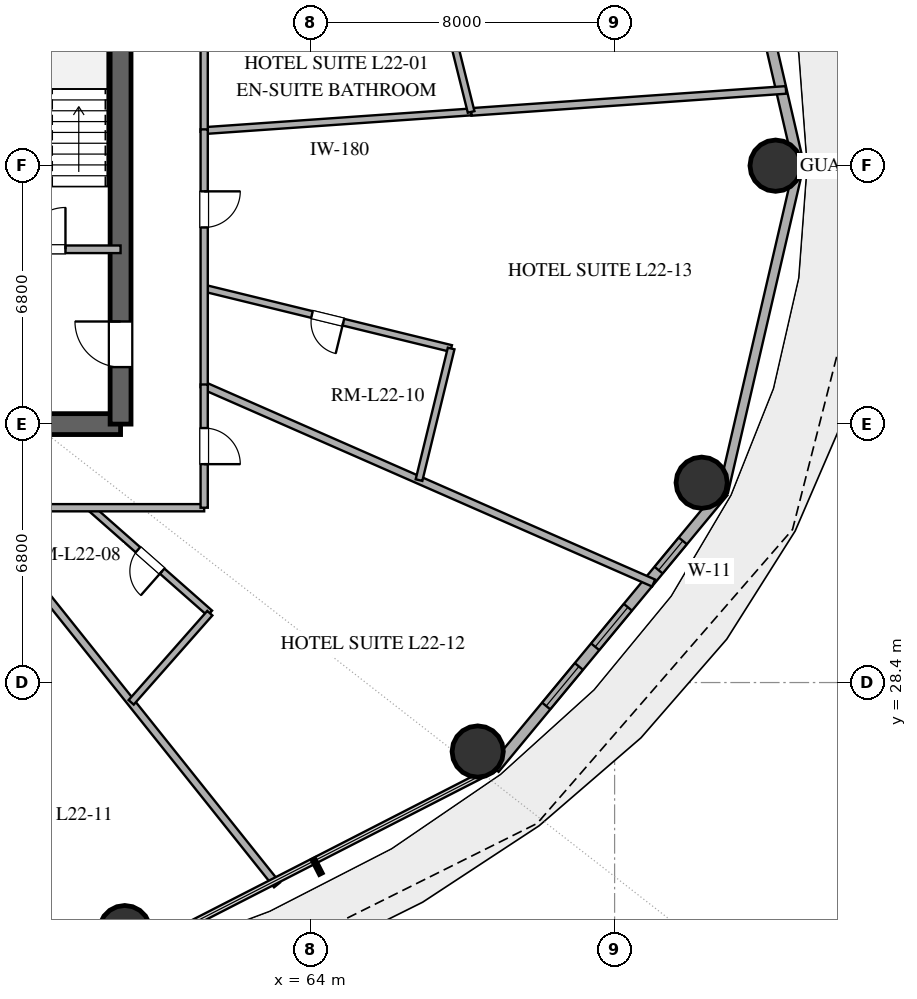
"""IFC4 building model, lengths in metres.
Left out: names, types, materials, properties, quantities, classifications, styles, units other than length and angle.
Written with IfcOpenShell. Run it as: python <this file> out.ifc"""

import sys

from ifc_helpers import new_model, si_unit, direction, frame, frame_2d, origin, origin_2d, place, context, subcontext, project, spatial, rectangle, hollow_circle, extrude, element, fill, save


model = new_model("IFC4")
c1 = context("Model", 3, precision=1e-05, world=origin(), true_north=direction((0.0, 1.0)))
c2 = subcontext(c1, "Body", "Model", "MODEL_VIEW")
j1 = project(units=[si_unit("LENGTHUNIT", "METRE"), si_unit("PLANEANGLEUNIT", "RADIAN")], contexts=[c1])
p1 = place(None, origin())
s1 = spatial("IfcSite", under=j1, at=p1, CompositionType="ELEMENT")
p2 = place(p1, origin())
s2 = spatial("IfcBuilding", under=s1, at=p2, CompositionType="ELEMENT")
p3 = place(p2, frame((0.0, 0.0, 91.2)))
s3 = spatial("IfcBuildingStorey", under=s2, at=p3, CompositionType="ELEMENT", Elevation=91.2)
p4 = place(p3, frame((55.0, 35.2, 0.0), z_axis=(0.0, 0.0, 1.0), x_axis=(1.0, 0.0, 0.0)))
e1 = element("IfcWall", 1, at=p4, inside=s3, PredefinedType="SHEAR", context=c2, shape_type="SweptSolid", body=[
    extrude(rectangle(XDim=4.0, YDim=0.55, at=frame_2d((2.0, 0.0))), origin(), (0.0, 0.0, 1.0), 3.38),
])
p5 = place(p3, frame((59.0, 35.2, 0.0), z_axis=(0.0, 0.0, 1.0), x_axis=(0.0, 1.0, 0.0)))
e2 = element("IfcWall", 2, at=p5, inside=s3, PredefinedType="SHEAR", context=c2, shape_type="SweptSolid", body=[
    extrude(rectangle(XDim=13.6, YDim=0.55, at=frame_2d((6.8, 0.0))), origin(), (0.0, 0.0, 1.0), 3.38),
])
p6 = place(p5, frame((1.5, 0.0, 0.0)))
e3 = element("IfcOpeningElement", 3, at=p6, cuts=e2, PredefinedType="OPENING", context=c2, shape_type="SweptSolid", body=[
    extrude(rectangle(XDim=1.2, YDim=2.15, at=frame_2d((0.6, 1.075))), frame((0.0, 0.285, 0.0), z_axis=(0.0, -1.0, 0.0), x_axis=(1.0, 0.0, 0.0)), (0.0, 0.0, 1.0), 0.57),
])
for number, where, z_axis, x_axis in (
    (4, (76.237, 42.0, 0.0), (0.0, 0.0, 1.0), (1.0, 0.0, 0.0)),
    (5, (59.11, 21.859, 0.0), (0.0, 0.0, 1.0), (1.0, 0.0, 0.0)),
    (6, (68.398, 26.585, 0.0), (0.0, 0.0, 1.0), (1.0, 0.0, 0.0)),
    (7, (74.291, 33.657, 0.0), (0.0, 0.0, 1.0), (1.0, 0.0, 0.0)),
):
    element("IfcColumn", number, at=place(p3, frame(where, z_axis=z_axis, x_axis=x_axis)), inside=s3, PredefinedType="COLUMN", context=c2, shape_type="SweptSolid", body=[
        extrude(hollow_circle(Radius=0.675, WallThickness=0.036, at=origin_2d()), origin(), (0.0, 0.0, 1.0), 3.38),
    ])
p7 = place(p3, frame((76.849, 42.0, 0.0), z_axis=(0.0, 0.0, 1.0), x_axis=(-0.22558597182, 0.974223264616, 0.0)))
e8 = element("IfcWall", 8, at=p7, inside=s3, PredefinedType="SOLIDWALL", context=c2, shape_type="SweptSolid", body=[
    extrude(rectangle(XDim=8.811, YDim=0.28, at=frame_2d((4.405, 0.0))), origin(), (0.0, 0.0, 1.0), 3.38),
])
p8 = place(p7, frame((6.175, 0.0, 0.0)))
e9 = element("IfcOpeningElement", 9, at=p8, cuts=e8, PredefinedType="OPENING", context=c2, shape_type="SweptSolid", body=[
    extrude(rectangle(XDim=1.1, YDim=2.25, at=frame_2d((0.55, 1.125))), frame((0.0, 0.15, 0.0), z_axis=(0.0, -1.0, 0.0), x_axis=(1.0, 0.0, 0.0)), (0.0, 0.0, 1.0), 0.3),
])
p9 = place(p3, frame((68.84, 26.14, 0.0), z_axis=(0.0, 0.0, 1.0), x_axis=(0.637505817448, 0.770445541696, 0.0)))
e10 = element("IfcWall", 10, at=p9, inside=s3, PredefinedType="SOLIDWALL", context=c2, shape_type="SweptSolid", body=[
    extrude(rectangle(XDim=9.445, YDim=0.28, at=frame_2d((4.723, 0.0))), origin(), (0.0, 0.0, 1.0), 3.38),
])
p10 = place(p9, frame((2.133, 0.0, 0.85)))
e11 = element("IfcOpeningElement", 11, at=p10, cuts=e10, PredefinedType="OPENING", context=c2, shape_type="SweptSolid", body=[
    extrude(rectangle(XDim=1.35, YDim=1.8, at=frame_2d((0.675, 0.9))), frame((0.0, 0.15, 0.0), z_axis=(0.0, -1.0, 0.0), x_axis=(1.0, 0.0, 0.0)), (0.0, 0.0, 1.0), 0.3),
])
p11 = place(p9, frame((4.156, 0.0, 0.85)))
e12 = element("IfcOpeningElement", 12, at=p11, cuts=e10, PredefinedType="OPENING", context=c2, shape_type="SweptSolid", body=[
    extrude(rectangle(XDim=1.35, YDim=1.8, at=frame_2d((0.675, 0.9))), frame((0.0, 0.15, 0.0), z_axis=(0.0, -1.0, 0.0), x_axis=(1.0, 0.0, 0.0)), (0.0, 0.0, 1.0), 0.3),
])
p12 = place(p9, frame((6.772, 0.0, 0.85)))
e13 = element("IfcOpeningElement", 13, at=p12, cuts=e10, PredefinedType="OPENING", context=c2, shape_type="SweptSolid", body=[
    extrude(rectangle(XDim=1.0, YDim=1.8, at=frame_2d((0.5, 0.9))), frame((0.0, 0.15, 0.0), z_axis=(0.0, -1.0, 0.0), x_axis=(1.0, 0.0, 0.0)), (0.0, 0.0, 1.0), 0.3),
])
p13 = place(p3, frame((74.861, 33.417, 0.0), z_axis=(0.0, 0.0, 1.0), x_axis=(0.22558597182, 0.974223264616, 0.0)))
e14 = element("IfcWall", 14, at=p13, inside=s3, PredefinedType="SOLIDWALL", context=c2, shape_type="SweptSolid", body=[
    extrude(rectangle(XDim=8.811, YDim=0.25, at=frame_2d((4.405, 0.0))), origin(), (0.0, 0.0, 1.0), 3.38),
])
p14 = place(p3, frame((55.0, 39.8, 0.0), z_axis=(0.0, 0.0, 1.0), x_axis=(1.0, 0.0, 0.0)))
e15 = element("IfcWall", 15, at=p14, inside=s3, PredefinedType="SOLIDWALL", context=c2, shape_type="SweptSolid", body=[
    extrude(rectangle(XDim=4.0, YDim=0.2, at=frame_2d((2.0, 0.0))), origin(), (0.0, 0.0, 1.0), 2.74),
])
p15 = place(p14, frame((1.45, 0.0, 0.0)))
e16 = element("IfcOpeningElement", 16, at=p15, cuts=e15, PredefinedType="OPENING", context=c2, shape_type="SweptSolid", body=[
    extrude(rectangle(XDim=1.1, YDim=2.15, at=frame_2d((0.55, 1.075))), frame((0.0, 0.11, 0.0), z_axis=(0.0, -1.0, 0.0), x_axis=(1.0, 0.0, 0.0)), (0.0, 0.0, 1.0), 0.22),
])
p16 = place(p3, frame((76.509, 43.994, 0.0), z_axis=(0.0, 0.0, 1.0), x_axis=(-0.997563838401, -0.069759503404, 0.0)))
e17 = element("IfcWall", 17, at=p16, inside=s3, PredefinedType="PARTITIONING", context=c2, shape_type="SweptSolid", body=[
    extrude(rectangle(XDim=8.305, YDim=0.2, at=frame_2d((4.152, 0.0))), origin(), (0.0, 0.0, 1.0), 2.74),
])
p17 = place(p3, frame((68.224, 43.414, 0.0), z_axis=(0.0, 0.0, 1.0), x_axis=(-0.997563891584, -0.06975874287, 0.0)))
e18 = element("IfcWall", 18, at=p17, inside=s3, PredefinedType="PLUMBINGWALL", context=c2, shape_type="SweptSolid", body=[
    extrude(rectangle(XDim=7.042, YDim=0.18, at=frame_2d((3.521, 0.0))), origin(), (0.0, 0.0, 1.0), 2.74),
])
p18 = place(p3, frame((61.2, 36.208, 0.0), z_axis=(0.0, 0.0, 1.0), x_axis=(0.915722078144, -0.401812239235, 0.0)))
e19 = element("IfcWall", 19, at=p18, inside=s3, PredefinedType="PARTITIONING", context=c2, shape_type="SweptSolid", body=[
    extrude(rectangle(XDim=12.915, YDim=0.2, at=frame_2d((6.458, 0.0))), origin(), (0.0, 0.0, 1.0), 2.74),
])
p19 = place(p3, frame((67.699, 37.189, 0.0), z_axis=(0.0, 0.0, 1.0), x_axis=(-0.971448370468, 0.237251055878, 0.0)))
e20 = element("IfcWall", 20, at=p19, inside=s3, PredefinedType="PLUMBINGWALL", context=c2, shape_type="SweptSolid", body=[
    extrude(rectangle(XDim=6.69, YDim=0.18, at=frame_2d((3.345, 0.0))), origin(), (0.0, 0.0, 1.0), 2.74),
])
p20 = place(p19, frame((2.92, 0.0, 0.0)))
e21 = element("IfcOpeningElement", 21, at=p20, cuts=e20, PredefinedType="OPENING", context=c2, shape_type="SweptSolid", body=[
    extrude(rectangle(XDim=0.85, YDim=2.1, at=frame_2d((0.425, 1.05))), frame((0.0, 0.1, 0.0), z_axis=(0.0, -1.0, 0.0), x_axis=(1.0, 0.0, 0.0)), (0.0, 0.0, 1.0), 0.2),
])
p21 = place(p3, frame((55.189, 33.0, 0.0), z_axis=(0.0, 0.0, 1.0), x_axis=(0.624085468444, -0.781356082767, 0.0)))
e22 = element("IfcWall", 22, at=p21, inside=s3, PredefinedType="PARTITIONING", context=c2, shape_type="SweptSolid", body=[
    extrude(rectangle(XDim=12.703, YDim=0.2, at=frame_2d((6.352, 0.0))), origin(), (0.0, 0.0, 1.0), 2.74),
])
p22 = place(p3, frame((61.2, 51.0, 0.0), z_axis=(0.0, 0.0, 1.0), x_axis=(0.0, -1.0, 0.0)))
e23 = element("IfcWall", 23, at=p22, inside=s3, PredefinedType="PARTITIONING", context=c2, shape_type="SweptSolid", body=[
    extrude(rectangle(XDim=8.109, YDim=0.19, at=frame_2d((4.055, 0.0))), origin(), (0.0, 0.0, 1.0), 2.74),
])
p23 = place(p22, frame((2.806, 0.0, 0.0)))
e24 = element("IfcOpeningElement", 24, at=p23, cuts=e23, PredefinedType="OPENING", context=c2, shape_type="SweptSolid", body=[
    extrude(rectangle(XDim=0.95, YDim=2.15, at=frame_2d((0.475, 1.075))), frame((0.0, 0.105, 0.0), z_axis=(0.0, -1.0, 0.0), x_axis=(1.0, 0.0, 0.0)), (0.0, 0.0, 1.0), 0.21),
])
p24 = place(p3, frame((61.2, 42.955, 0.0), z_axis=(0.0, 0.0, 1.0), x_axis=(0.0, -1.0, 0.0)))
e25 = element("IfcWall", 25, at=p24, inside=s3, PredefinedType="PARTITIONING", context=c2, shape_type="SweptSolid", body=[
    extrude(rectangle(XDim=6.782, YDim=0.19, at=frame_2d((3.391, 0.0))), origin(), (0.0, 0.0, 1.0), 2.74),
])
p25 = place(p24, frame((1.631, 0.0, 0.0)))
e26 = element("IfcOpeningElement", 26, at=p25, cuts=e25, PredefinedType="OPENING", context=c2, shape_type="SweptSolid", body=[
    extrude(rectangle(XDim=0.95, YDim=2.15, at=frame_2d((0.475, 1.075))), frame((0.0, 0.105, 0.0), z_axis=(0.0, -1.0, 0.0), x_axis=(1.0, 0.0, 0.0)), (0.0, 0.0, 1.0), 0.21),
])
p26 = place(p3, frame((61.348, 30.225, 0.0), z_axis=(0.0, 0.0, 1.0), x_axis=(-0.749931272561, 0.661515749197, 0.0)))
e27 = element("IfcWall", 27, at=p26, inside=s3, PredefinedType="PLUMBINGWALL", context=c2, shape_type="SweptSolid", body=[
    extrude(rectangle(XDim=4.194, YDim=0.18, at=frame_2d((2.097, 0.0))), origin(), (0.0, 0.0, 1.0), 2.74),
])
p27 = place(p26, frame((1.672, 0.0, 0.0)))
e28 = element("IfcOpeningElement", 28, at=p27, cuts=e27, PredefinedType="OPENING", context=c2, shape_type="SweptSolid", body=[
    extrude(rectangle(XDim=0.85, YDim=2.1, at=frame_2d((0.425, 1.05))), frame((0.0, 0.1, 0.0), z_axis=(0.0, -1.0, 0.0), x_axis=(1.0, 0.0, 0.0)), (0.0, 0.0, 1.0), 0.2),
])
p28 = place(p3, frame((61.2, 33.0, 0.0), z_axis=(0.0, 0.0, 1.0), x_axis=(-1.0, 0.0, 0.0)))
e29 = element("IfcWall", 29, at=p28, inside=s3, PredefinedType="PARTITIONING", context=c2, shape_type="SweptSolid", body=[
    extrude(rectangle(XDim=11.496, YDim=0.19, at=frame_2d((5.748, 0.0))), origin(), (0.0, 0.0, 1.0), 2.74),
])
p29 = place(p28, frame((7.41, 0.0, 0.0)))
e30 = element("IfcOpeningElement", 30, at=p29, cuts=e29, PredefinedType="OPENING", context=c2, shape_type="SweptSolid", body=[
    extrude(rectangle(XDim=0.95, YDim=2.15, at=frame_2d((0.475, 1.075))), frame((0.0, 0.105, 0.0), z_axis=(0.0, -1.0, 0.0), x_axis=(1.0, 0.0, 0.0)), (0.0, 0.0, 1.0), 0.21),
])
p30 = place(p3, frame((66.853, 33.727, 0.0), z_axis=(0.0, 0.0, 1.0), x_axis=(0.237213207876, 0.971457613079, 0.0)))
e31 = element("IfcWall", 31, at=p30, inside=s3, PredefinedType="PLUMBINGWALL", context=c2, shape_type="SweptSolid", body=[
    extrude(rectangle(XDim=3.564, YDim=0.18, at=frame_2d((1.782, 0.0))), origin(), (0.0, 0.0, 1.0), 2.74),
])
p31 = place(p3, frame((67.377, 46.82, 0.0), z_axis=(0.0, 0.0, 1.0), x_axis=(0.241373388957, -0.970432319692, 0.0)))
e32 = element("IfcWall", 32, at=p31, inside=s3, PredefinedType="PLUMBINGWALL", context=c2, shape_type="SweptSolid", body=[
    extrude(rectangle(XDim=3.51, YDim=0.18, at=frame_2d((1.755, 0.0))), origin(), (0.0, 0.0, 1.0), 2.74),
])
p32 = place(p3, frame((61.2, 36.243, 0.0), z_axis=(0.0, 0.0, 1.0), x_axis=(0.0, -1.0, 0.0)))
e33 = element("IfcWall", 33, at=p32, inside=s3, PredefinedType="PARTITIONING", context=c2, shape_type="SweptSolid", body=[
    extrude(rectangle(XDim=3.243, YDim=0.19, at=frame_2d((1.621, 0.0))), origin(), (0.0, 0.0, 1.0), 2.74),
])
p33 = place(p32, frame((1.146, 0.0, 0.0)))
e34 = element("IfcOpeningElement", 34, at=p33, cuts=e33, PredefinedType="OPENING", context=c2, shape_type="SweptSolid", body=[
    extrude(rectangle(XDim=0.95, YDim=2.15, at=frame_2d((0.475, 1.075))), frame((0.0, 0.105, 0.0), z_axis=(0.0, -1.0, 0.0), x_axis=(1.0, 0.0, 0.0)), (0.0, 0.0, 1.0), 0.21),
])
p34 = place(p3, frame((59.279, 27.879, 0.0), z_axis=(0.0, 0.0, 1.0), x_axis=(0.661515810511, 0.749931218475, 0.0)))
e35 = element("IfcWall", 35, at=p34, inside=s3, PredefinedType="PLUMBINGWALL", context=c2, shape_type="SweptSolid", body=[
    extrude(rectangle(XDim=3.129, YDim=0.18, at=frame_2d((1.564, 0.0))), origin(), (0.0, 0.0, 1.0), 2.74),
])
p35 = place(p10, origin())
e36 = element("IfcWindow", 36, at=p35, inside=s3, PartitioningType="SINGLE_PANEL", PredefinedType="WINDOW", context=c2, shape_type="SweptSolid", body=[
    extrude(rectangle(XDim=1.35, YDim=1.8, at=frame_2d((0.675, 0.9))), frame((0.0, 0.03, 0.0), z_axis=(0.0, -1.0, 0.0), x_axis=(1.0, 0.0, 0.0)), (0.0, 0.0, 1.0), 0.06),
])
fill(e11, e36)
p36 = place(p11, origin())
e37 = element("IfcWindow", 37, at=p36, inside=s3, PartitioningType="SINGLE_PANEL", PredefinedType="WINDOW", context=c2, shape_type="SweptSolid", body=[
    extrude(rectangle(XDim=1.35, YDim=1.8, at=frame_2d((0.675, 0.9))), frame((0.0, 0.03, 0.0), z_axis=(0.0, -1.0, 0.0), x_axis=(1.0, 0.0, 0.0)), (0.0, 0.0, 1.0), 0.06),
])
fill(e12, e37)
p37 = place(p12, origin())
e38 = element("IfcWindow", 38, at=p37, inside=s3, PartitioningType="SINGLE_PANEL", PredefinedType="WINDOW", context=c2, shape_type="SweptSolid", body=[
    extrude(rectangle(XDim=1.0, YDim=1.8, at=frame_2d((0.5, 0.9))), frame((0.0, 0.03, 0.0), z_axis=(0.0, -1.0, 0.0), x_axis=(1.0, 0.0, 0.0)), (0.0, 0.0, 1.0), 0.06),
])
fill(e13, e38)
p38 = place(p6, origin())
e39 = element("IfcDoor", 39, at=p38, inside=s3, OperationType="SINGLE_SWING_RIGHT", PredefinedType="DOOR", context=c2, shape_type="SweptSolid", body=[
    extrude(rectangle(XDim=1.2, YDim=2.15, at=frame_2d((0.6, 1.075))), frame((0.0, 0.025, 0.0), z_axis=(0.0, -1.0, 0.0), x_axis=(1.0, 0.0, 0.0)), (0.0, 0.0, 1.0), 0.05),
])
fill(e3, e39)
p39 = place(p15, origin())
e40 = element("IfcDoor", 40, at=p39, inside=s3, OperationType="SINGLE_SWING_RIGHT", PredefinedType="DOOR", context=c2, shape_type="SweptSolid", body=[
    extrude(rectangle(XDim=1.1, YDim=2.15, at=frame_2d((0.55, 1.075))), frame((0.0, 0.025, 0.0), z_axis=(0.0, -1.0, 0.0), x_axis=(1.0, 0.0, 0.0)), (0.0, 0.0, 1.0), 0.05),
])
fill(e16, e40)
p40 = place(p20, origin())
e41 = element("IfcDoor", 41, at=p40, inside=s3, OperationType="SINGLE_SWING_LEFT", PredefinedType="DOOR", context=c2, shape_type="SweptSolid", body=[
    extrude(rectangle(XDim=0.85, YDim=2.1, at=frame_2d((0.425, 1.05))), frame((0.0, 0.025, 0.0), z_axis=(0.0, -1.0, 0.0), x_axis=(1.0, 0.0, 0.0)), (0.0, 0.0, 1.0), 0.05),
])
fill(e21, e41)
p41 = place(p25, origin())
e42 = element("IfcDoor", 42, at=p41, inside=s3, OperationType="SINGLE_SWING_LEFT", PredefinedType="DOOR", context=c2, shape_type="SweptSolid", body=[
    extrude(rectangle(XDim=0.95, YDim=2.15, at=frame_2d((0.475, 1.075))), frame((0.0, 0.025, 0.0), z_axis=(0.0, -1.0, 0.0), x_axis=(1.0, 0.0, 0.0)), (0.0, 0.0, 1.0), 0.05),
])
fill(e26, e42)
p42 = place(p27, origin())
e43 = element("IfcDoor", 43, at=p42, inside=s3, OperationType="SINGLE_SWING_LEFT", PredefinedType="DOOR", context=c2, shape_type="SweptSolid", body=[
    extrude(rectangle(XDim=0.85, YDim=2.1, at=frame_2d((0.425, 1.05))), frame((0.0, 0.025, 0.0), z_axis=(0.0, -1.0, 0.0), x_axis=(1.0, 0.0, 0.0)), (0.0, 0.0, 1.0), 0.05),
])
fill(e28, e43)
p43 = place(p33, origin())
e44 = element("IfcDoor", 44, at=p43, inside=s3, OperationType="SINGLE_SWING_RIGHT", PredefinedType="DOOR", context=c2, shape_type="SweptSolid", body=[
    extrude(rectangle(XDim=0.95, YDim=2.15, at=frame_2d((0.475, 1.075))), frame((0.0, 0.025, 0.0), z_axis=(0.0, -1.0, 0.0), x_axis=(1.0, 0.0, 0.0)), (0.0, 0.0, 1.0), 0.05),
])
fill(e34, e44)
save(model, sys.argv[1])
